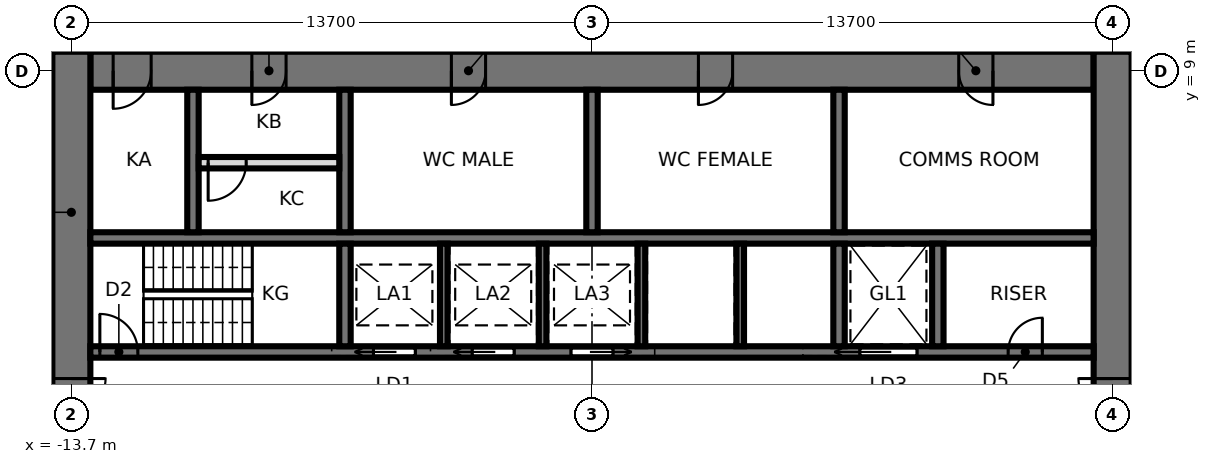
"""IFC4 building model, lengths in metres.
Left out: names, types, materials, properties, quantities, classifications, styles, units other than length and angle.
Written with IfcOpenShell. Run it as: python <this file> out.ifc"""

import sys

from ifc_helpers import new_model, si_unit, direction, frame, frame_2d, origin, place, context, subcontext, project, spatial, rectangle, extrude, element, fill, save


model = new_model("IFC4")
c1 = context("Model", 3, precision=1e-05, world=origin(), true_north=direction((0.0, 1.0)))
c2 = subcontext(c1, "Body", "Model", "MODEL_VIEW")
j1 = project(units=[si_unit("LENGTHUNIT", "METRE"), si_unit("PLANEANGLEUNIT", "RADIAN")], contexts=[c1])
p1 = place(None, origin())
s1 = spatial("IfcSite", under=j1, at=p1, CompositionType="ELEMENT")
p2 = place(p1, origin())
s2 = spatial("IfcBuilding", under=s1, at=p2, CompositionType="ELEMENT")
p3 = place(p2, frame((0.0, 0.0, 44.8)))
s3 = spatial("IfcBuildingStorey", under=s2, at=p3, CompositionType="ELEMENT", Elevation=44.8)
p4 = place(p3, frame((13.2, 9.0, 0.0), z_axis=(0.0, 0.0, 1.0), x_axis=(-1.0, 0.0, 0.0)))
e1 = element("IfcWall", 1, at=p4, inside=s3, PredefinedType="SHEAR", context=c2, shape_type="SweptSolid", body=[
    extrude(rectangle(XDim=26.4, YDim=1.0, at=frame_2d((13.2, 0.0))), origin(), (0.0, 0.0, 1.0), 4.2),
])
p5 = place(p4, frame((2.65, 0.0, 0.0)))
e2 = element("IfcOpeningElement", 2, at=p5, cuts=e1, PredefinedType="OPENING", context=c2, shape_type="SweptSolid", body=[
    extrude(rectangle(XDim=0.9, YDim=2.1, at=frame_2d((0.45, 1.05))), frame((0.0, 0.51, 0.0), z_axis=(0.0, -1.0, 0.0), x_axis=(1.0, 0.0, 0.0)), (0.0, 0.0, 1.0), 1.02),
])
p6 = place(p4, frame((9.5, 0.0, 0.0)))
e3 = element("IfcOpeningElement", 3, at=p6, cuts=e1, PredefinedType="OPENING", context=c2, shape_type="SweptSolid", body=[
    extrude(rectangle(XDim=0.9, YDim=2.1, at=frame_2d((0.45, 1.05))), frame((0.0, 0.51, 0.0), z_axis=(0.0, -1.0, 0.0), x_axis=(1.0, 0.0, 0.0)), (0.0, 0.0, 1.0), 1.02),
])
p7 = place(p4, frame((16.0, 0.0, 0.0)))
e4 = element("IfcOpeningElement", 4, at=p7, cuts=e1, PredefinedType="OPENING", context=c2, shape_type="SweptSolid", body=[
    extrude(rectangle(XDim=0.9, YDim=2.1, at=frame_2d((0.45, 1.05))), frame((0.0, 0.51, 0.0), z_axis=(0.0, -1.0, 0.0), x_axis=(1.0, 0.0, 0.0)), (0.0, 0.0, 1.0), 1.02),
])
p8 = place(p4, frame((21.25, 0.0, 0.0)))
e5 = element("IfcOpeningElement", 5, at=p8, cuts=e1, PredefinedType="OPENING", context=c2, shape_type="SweptSolid", body=[
    extrude(rectangle(XDim=0.9, YDim=2.1, at=frame_2d((0.45, 1.05))), frame((0.0, 0.51, 0.0), z_axis=(0.0, -1.0, 0.0), x_axis=(1.0, 0.0, 0.0)), (0.0, 0.0, 1.0), 1.02),
])
p9 = place(p4, frame((24.8, 0.0, 0.0)))
e6 = element("IfcOpeningElement", 6, at=p9, cuts=e1, PredefinedType="OPENING", context=c2, shape_type="SweptSolid", body=[
    extrude(rectangle(XDim=1.0, YDim=2.1, at=frame_2d((0.5, 1.05))), frame((0.0, 0.51, 0.0), z_axis=(0.0, -1.0, 0.0), x_axis=(1.0, 0.0, 0.0)), (0.0, 0.0, 1.0), 1.02),
])
p10 = place(p3, frame((13.7, -9.5, 0.0), z_axis=(0.0, 0.0, 1.0), x_axis=(0.0, 1.0, 0.0)))
e7 = element("IfcWall", 7, at=p10, inside=s3, PredefinedType="SHEAR", context=c2, shape_type="SweptSolid", body=[
    extrude(rectangle(XDim=19.0, YDim=1.0, at=frame_2d((9.5, 0.0))), origin(), (0.0, 0.0, 1.0), 4.2),
])
p11 = place(p10, frame((8.6, 0.0, 0.0)))
e8 = element("IfcOpeningElement", 8, at=p11, cuts=e7, PredefinedType="OPENING", context=c2, shape_type="SweptSolid", body=[
    extrude(rectangle(XDim=1.8, YDim=2.4, at=frame_2d((0.9, 1.2))), frame((0.0, 0.51, 0.0), z_axis=(0.0, -1.0, 0.0), x_axis=(1.0, 0.0, 0.0)), (0.0, 0.0, 1.0), 1.02),
])
p12 = place(p3, frame((-13.7, 9.5, 0.0), z_axis=(0.0, 0.0, 1.0), x_axis=(0.0, -1.0, 0.0)))
e9 = element("IfcWall", 9, at=p12, inside=s3, PredefinedType="SHEAR", context=c2, shape_type="SweptSolid", body=[
    extrude(rectangle(XDim=19.0, YDim=1.0, at=frame_2d((9.5, 0.0))), origin(), (0.0, 0.0, 1.0), 4.2),
])
p13 = place(p12, frame((8.6, 0.0, 0.0)))
e10 = element("IfcOpeningElement", 10, at=p13, cuts=e9, PredefinedType="OPENING", context=c2, shape_type="SweptSolid", body=[
    extrude(rectangle(XDim=1.8, YDim=2.4, at=frame_2d((0.9, 1.2))), frame((0.0, 0.51, 0.0), z_axis=(0.0, -1.0, 0.0), x_axis=(1.0, 0.0, 0.0)), (0.0, 0.0, 1.0), 1.02),
])
p14 = place(p3, frame((-13.2, 1.6, 0.0), z_axis=(0.0, 0.0, 1.0), x_axis=(1.0, 0.0, 0.0)))
e11 = element("IfcWall", 11, at=p14, inside=s3, PredefinedType="SHEAR", context=c2, shape_type="SweptSolid", body=[
    extrude(rectangle(XDim=26.4, YDim=0.3, at=frame_2d((13.2, 0.0))), origin(), (0.0, 0.0, 1.0), 4.2),
])
p15 = place(p14, frame((0.25, 0.0, 0.0)))
e12 = element("IfcOpeningElement", 12, at=p15, cuts=e11, PredefinedType="OPENING", context=c2, shape_type="SweptSolid", body=[
    extrude(rectangle(XDim=1.0, YDim=2.1, at=frame_2d((0.5, 1.05))), frame((0.0, 0.16, 0.0), z_axis=(0.0, -1.0, 0.0), x_axis=(1.0, 0.0, 0.0)), (0.0, 0.0, 1.0), 0.32),
])
p16 = place(p14, frame((20.25, 0.0, 0.0)))
e13 = element("IfcOpeningElement", 13, at=p16, cuts=e11, PredefinedType="OPENING", context=c2, shape_type="SweptSolid", body=[
    extrude(rectangle(XDim=1.5, YDim=2.4, at=frame_2d((0.75, 1.2))), frame((0.0, 0.16, 0.0), z_axis=(0.0, -1.0, 0.0), x_axis=(1.0, 0.0, 0.0)), (0.0, 0.0, 1.0), 0.32),
])
p17 = place(p14, frame((7.45, 0.0, 0.0)))
e14 = element("IfcOpeningElement", 14, at=p17, cuts=e11, PredefinedType="OPENING", context=c2, shape_type="SweptSolid", body=[
    extrude(rectangle(XDim=1.1, YDim=2.3, at=frame_2d((0.55, 1.15))), frame((0.0, 0.16, 0.0), z_axis=(0.0, -1.0, 0.0), x_axis=(1.0, 0.0, 0.0)), (0.0, 0.0, 1.0), 0.32),
])
p18 = place(p14, frame((10.05, 0.0, 0.0)))
e15 = element("IfcOpeningElement", 15, at=p18, cuts=e11, PredefinedType="OPENING", context=c2, shape_type="SweptSolid", body=[
    extrude(rectangle(XDim=1.1, YDim=2.3, at=frame_2d((0.55, 1.15))), frame((0.0, 0.16, 0.0), z_axis=(0.0, -1.0, 0.0), x_axis=(1.0, 0.0, 0.0)), (0.0, 0.0, 1.0), 0.32),
])
p19 = place(p14, frame((12.65, 0.0, 0.0)))
e16 = element("IfcOpeningElement", 16, at=p19, cuts=e11, PredefinedType="OPENING", context=c2, shape_type="SweptSolid", body=[
    extrude(rectangle(XDim=1.1, YDim=2.3, at=frame_2d((0.55, 1.15))), frame((0.0, 0.16, 0.0), z_axis=(0.0, -1.0, 0.0), x_axis=(1.0, 0.0, 0.0)), (0.0, 0.0, 1.0), 0.32),
])
p20 = place(p14, frame((24.15, 0.0, 0.0)))
e17 = element("IfcOpeningElement", 17, at=p20, cuts=e11, PredefinedType="OPENING", context=c2, shape_type="SweptSolid", body=[
    extrude(rectangle(XDim=0.9, YDim=2.1, at=frame_2d((0.45, 1.05))), frame((0.0, 0.16, 0.0), z_axis=(0.0, -1.0, 0.0), x_axis=(1.0, 0.0, 0.0)), (0.0, 0.0, 1.0), 0.32),
])
p21 = place(p3, frame((-13.2, 4.6, 0.0), z_axis=(0.0, 0.0, 1.0), x_axis=(1.0, 0.0, 0.0)))
e18 = element("IfcWall", 18, at=p21, inside=s3, PredefinedType="SHEAR", context=c2, shape_type="SweptSolid", body=[
    extrude(rectangle(XDim=26.4, YDim=0.3, at=frame_2d((13.2, 0.0))), origin(), (0.0, 0.0, 1.0), 4.2),
])
p22 = place(p3, frame((-6.5, 1.75, 0.0), z_axis=(0.0, 0.0, 1.0), x_axis=(0.0, 1.0, 0.0)))
e19 = element("IfcWall", 19, at=p22, inside=s3, PredefinedType="SHEAR", context=c2, shape_type="SweptSolid", body=[
    extrude(rectangle(XDim=2.7, YDim=0.3, at=frame_2d((1.35, 0.0))), origin(), (0.0, 0.0, 1.0), 4.2),
])
p23 = place(p3, frame((-6.5, 4.75, 0.0), z_axis=(0.0, 0.0, 1.0), x_axis=(0.0, 1.0, 0.0)))
e20 = element("IfcWall", 20, at=p23, inside=s3, PredefinedType="SHEAR", context=c2, shape_type="SweptSolid", body=[
    extrude(rectangle(XDim=3.75, YDim=0.3, at=frame_2d((1.875, 0.0))), origin(), (0.0, 0.0, 1.0), 4.2),
])
p24 = place(p3, frame((6.5, 1.75, 0.0), z_axis=(0.0, 0.0, 1.0), x_axis=(0.0, 1.0, 0.0)))
e21 = element("IfcWall", 21, at=p24, inside=s3, PredefinedType="SHEAR", context=c2, shape_type="SweptSolid", body=[
    extrude(rectangle(XDim=2.7, YDim=0.3, at=frame_2d((1.35, 0.0))), origin(), (0.0, 0.0, 1.0), 4.2),
])
p25 = place(p3, frame((6.5, 4.75, 0.0), z_axis=(0.0, 0.0, 1.0), x_axis=(0.0, 1.0, 0.0)))
e22 = element("IfcWall", 22, at=p25, inside=s3, PredefinedType="SHEAR", context=c2, shape_type="SweptSolid", body=[
    extrude(rectangle(XDim=3.75, YDim=0.3, at=frame_2d((1.875, 0.0))), origin(), (0.0, 0.0, 1.0), 4.2),
])
for number, where, z_axis, x_axis in (
    (23, (-3.9, 1.75, 0.0), (0.0, 0.0, 1.0), (0.0, 1.0, 0.0)),
    (24, (-1.3, 1.75, 0.0), (0.0, 0.0, 1.0), (0.0, 1.0, 0.0)),
    (25, (1.3, 1.75, 0.0), (0.0, 0.0, 1.0), (0.0, 1.0, 0.0)),
    (26, (3.9, 1.75, 0.0), (0.0, 0.0, 1.0), (0.0, 1.0, 0.0)),
):
    element("IfcWall", number, at=place(p3, frame(where, z_axis=z_axis, x_axis=x_axis)), inside=s3, PredefinedType="SHEAR", context=c2, shape_type="SweptSolid", body=[
        extrude(rectangle(XDim=2.7, YDim=0.2, at=frame_2d((1.35, 0.0))), origin(), (0.0, 0.0, 1.0), 4.2),
    ])
for number, where, z_axis, x_axis in (
    (27, (0.0, 4.75, 0.0), (0.0, 0.0, 1.0), (0.0, 1.0, 0.0)),
    (28, (-10.5, 4.75, 0.0), (0.0, 0.0, 1.0), (0.0, 1.0, 0.0)),
):
    element("IfcWall", number, at=place(p3, frame(where, z_axis=z_axis, x_axis=x_axis)), inside=s3, PredefinedType="SHEAR", context=c2, shape_type="SweptSolid", body=[
        extrude(rectangle(XDim=3.75, YDim=0.3, at=frame_2d((1.875, 0.0))), origin(), (0.0, 0.0, 1.0), 4.2),
    ])
p26 = place(p3, frame((9.1, 1.75, 0.0), z_axis=(0.0, 0.0, 1.0), x_axis=(0.0, 1.0, 0.0)))
e29 = element("IfcWall", 29, at=p26, inside=s3, PredefinedType="SHEAR", context=c2, shape_type="SweptSolid", body=[
    extrude(rectangle(XDim=2.7, YDim=0.3, at=frame_2d((1.35, 0.0))), origin(), (0.0, 0.0, 1.0), 4.2),
])
p27 = place(p3, frame((-10.35, 6.58, 0.0), z_axis=(0.0, 0.0, 1.0), x_axis=(1.0, 0.0, 0.0)))
e30 = element("IfcWall", 30, at=p27, inside=s3, PredefinedType="PARTITIONING", context=c2, shape_type="SweptSolid", body=[
    extrude(rectangle(XDim=3.7, YDim=0.3, at=frame_2d((1.85, 0.0))), origin(), (0.0, 0.0, 1.0), 4.04),
])
p28 = place(p27, frame((0.25, 0.0, 0.0)))
e31 = element("IfcOpeningElement", 31, at=p28, cuts=e30, PredefinedType="OPENING", context=c2, shape_type="SweptSolid", body=[
    extrude(rectangle(XDim=1.0, YDim=2.4, at=frame_2d((0.5, 1.2))), frame((0.0, 0.16, 0.0), z_axis=(0.0, -1.0, 0.0), x_axis=(1.0, 0.0, 0.0)), (0.0, 0.0, 1.0), 0.32),
])
p29 = place(p13, origin())
e32 = element("IfcDoor", 32, at=p29, inside=s3, OperationType="DOUBLE_DOOR_SINGLE_SWING", PredefinedType="DOOR", context=c2, shape_type="SweptSolid", body=[
    extrude(rectangle(XDim=1.72, YDim=2.36, at=frame_2d((0.9, 1.18))), frame((0.0, 0.025, 0.0), z_axis=(0.0, -1.0, 0.0), x_axis=(1.0, 0.0, 0.0)), (0.0, 0.0, 1.0), 0.05),
    extrude(rectangle(XDim=0.04, YDim=2.4, at=frame_2d((0.02, 1.2))), frame((0.0, 0.25, 0.0), z_axis=(0.0, -1.0, 0.0), x_axis=(1.0, 0.0, 0.0)), (0.0, 0.0, 1.0), 0.5),
    extrude(rectangle(XDim=0.04, YDim=2.4, at=frame_2d((1.78, 1.2))), frame((0.0, 0.25, 0.0), z_axis=(0.0, -1.0, 0.0), x_axis=(1.0, 0.0, 0.0)), (0.0, 0.0, 1.0), 0.5),
    extrude(rectangle(XDim=1.72, YDim=0.04, at=frame_2d((0.9, 2.38))), frame((0.0, 0.25, 0.0), z_axis=(0.0, -1.0, 0.0), x_axis=(1.0, 0.0, 0.0)), (0.0, 0.0, 1.0), 0.5),
])
fill(e10, e32)
p30 = place(p11, origin())
e33 = element("IfcDoor", 33, at=p30, inside=s3, OperationType="DOUBLE_DOOR_SINGLE_SWING", PredefinedType="DOOR", context=c2, shape_type="SweptSolid", body=[
    extrude(rectangle(XDim=1.72, YDim=2.36, at=frame_2d((0.9, 1.18))), frame((0.0, 0.025, 0.0), z_axis=(0.0, -1.0, 0.0), x_axis=(1.0, 0.0, 0.0)), (0.0, 0.0, 1.0), 0.05),
    extrude(rectangle(XDim=0.04, YDim=2.4, at=frame_2d((0.02, 1.2))), frame((0.0, 0.25, 0.0), z_axis=(0.0, -1.0, 0.0), x_axis=(1.0, 0.0, 0.0)), (0.0, 0.0, 1.0), 0.5),
    extrude(rectangle(XDim=0.04, YDim=2.4, at=frame_2d((1.78, 1.2))), frame((0.0, 0.25, 0.0), z_axis=(0.0, -1.0, 0.0), x_axis=(1.0, 0.0, 0.0)), (0.0, 0.0, 1.0), 0.5),
    extrude(rectangle(XDim=1.72, YDim=0.04, at=frame_2d((0.9, 2.38))), frame((0.0, 0.25, 0.0), z_axis=(0.0, -1.0, 0.0), x_axis=(1.0, 0.0, 0.0)), (0.0, 0.0, 1.0), 0.5),
])
fill(e8, e33)
p31 = place(p15, origin())
e34 = element("IfcDoor", 34, at=p31, inside=s3, OperationType="SINGLE_SWING_LEFT", PredefinedType="DOOR", context=c2, shape_type="SweptSolid", body=[
    extrude(rectangle(XDim=1.0, YDim=2.1, at=frame_2d((0.5, 1.05))), frame((0.0, 0.025, 0.0), z_axis=(0.0, -1.0, 0.0), x_axis=(1.0, 0.0, 0.0)), (0.0, 0.0, 1.0), 0.05),
])
fill(e12, e34)
p32 = place(p16, origin())
e35 = element("IfcDoor", 35, at=p32, inside=s3, OperationType="SLIDING_TO_LEFT", PredefinedType="DOOR", context=c2, shape_type="SweptSolid", body=[
    extrude(rectangle(XDim=1.5, YDim=2.4, at=frame_2d((0.75, 1.2))), frame((0.0, 0.025, 0.0), z_axis=(0.0, -1.0, 0.0), x_axis=(1.0, 0.0, 0.0)), (0.0, 0.0, 1.0), 0.05),
])
fill(e13, e35)
p33 = place(p17, origin())
e36 = element("IfcDoor", 36, at=p33, inside=s3, OperationType="SLIDING_TO_LEFT", PredefinedType="DOOR", context=c2, shape_type="SweptSolid", body=[
    extrude(rectangle(XDim=1.1, YDim=2.3, at=frame_2d((0.55, 1.15))), frame((0.0, 0.025, 0.0), z_axis=(0.0, -1.0, 0.0), x_axis=(1.0, 0.0, 0.0)), (0.0, 0.0, 1.0), 0.05),
])
fill(e14, e36)
p34 = place(p18, origin())
e37 = element("IfcDoor", 37, at=p34, inside=s3, OperationType="SLIDING_TO_LEFT", PredefinedType="DOOR", context=c2, shape_type="SweptSolid", body=[
    extrude(rectangle(XDim=1.1, YDim=2.3, at=frame_2d((0.55, 1.15))), frame((0.0, 0.025, 0.0), z_axis=(0.0, -1.0, 0.0), x_axis=(1.0, 0.0, 0.0)), (0.0, 0.0, 1.0), 0.05),
])
fill(e15, e37)
p35 = place(p19, origin())
e38 = element("IfcDoor", 38, at=p35, inside=s3, OperationType="SLIDING_TO_RIGHT", PredefinedType="DOOR", context=c2, shape_type="SweptSolid", body=[
    extrude(rectangle(XDim=1.1, YDim=2.3, at=frame_2d((0.55, 1.15))), frame((0.0, 0.025, 0.0), z_axis=(0.0, -1.0, 0.0), x_axis=(1.0, 0.0, 0.0)), (0.0, 0.0, 1.0), 0.05),
])
fill(e16, e38)
p36 = place(p20, origin())
e39 = element("IfcDoor", 39, at=p36, inside=s3, OperationType="SINGLE_SWING_RIGHT", PredefinedType="DOOR", context=c2, shape_type="SweptSolid", body=[
    extrude(rectangle(XDim=0.9, YDim=2.1, at=frame_2d((0.45, 1.05))), frame((0.0, 0.025, 0.0), z_axis=(0.0, -1.0, 0.0), x_axis=(1.0, 0.0, 0.0)), (0.0, 0.0, 1.0), 0.05),
])
fill(e17, e39)
p37 = place(p5, origin())
e40 = element("IfcDoor", 40, at=p37, inside=s3, OperationType="SINGLE_SWING_LEFT", PredefinedType="DOOR", context=c2, shape_type="SweptSolid", body=[
    extrude(rectangle(XDim=0.82, YDim=2.06, at=frame_2d((0.45, 1.03))), frame((0.0, 0.025, 0.0), z_axis=(0.0, -1.0, 0.0), x_axis=(1.0, 0.0, 0.0)), (0.0, 0.0, 1.0), 0.05),
    extrude(rectangle(XDim=0.04, YDim=2.1, at=frame_2d((0.02, 1.05))), frame((0.0, 0.25, 0.0), z_axis=(0.0, -1.0, 0.0), x_axis=(1.0, 0.0, 0.0)), (0.0, 0.0, 1.0), 0.5),
    extrude(rectangle(XDim=0.04, YDim=2.1, at=frame_2d((0.88, 1.05))), frame((0.0, 0.25, 0.0), z_axis=(0.0, -1.0, 0.0), x_axis=(1.0, 0.0, 0.0)), (0.0, 0.0, 1.0), 0.5),
    extrude(rectangle(XDim=0.82, YDim=0.04, at=frame_2d((0.45, 2.08))), frame((0.0, 0.25, 0.0), z_axis=(0.0, -1.0, 0.0), x_axis=(1.0, 0.0, 0.0)), (0.0, 0.0, 1.0), 0.5),
])
fill(e2, e40)
p38 = place(p6, origin())
e41 = element("IfcDoor", 41, at=p38, inside=s3, OperationType="SINGLE_SWING_RIGHT", PredefinedType="DOOR", context=c2, shape_type="SweptSolid", body=[
    extrude(rectangle(XDim=0.82, YDim=2.06, at=frame_2d((0.45, 1.03))), frame((0.0, 0.025, 0.0), z_axis=(0.0, -1.0, 0.0), x_axis=(1.0, 0.0, 0.0)), (0.0, 0.0, 1.0), 0.05),
    extrude(rectangle(XDim=0.04, YDim=2.1, at=frame_2d((0.02, 1.05))), frame((0.0, 0.25, 0.0), z_axis=(0.0, -1.0, 0.0), x_axis=(1.0, 0.0, 0.0)), (0.0, 0.0, 1.0), 0.5),
    extrude(rectangle(XDim=0.04, YDim=2.1, at=frame_2d((0.88, 1.05))), frame((0.0, 0.25, 0.0), z_axis=(0.0, -1.0, 0.0), x_axis=(1.0, 0.0, 0.0)), (0.0, 0.0, 1.0), 0.5),
    extrude(rectangle(XDim=0.82, YDim=0.04, at=frame_2d((0.45, 2.08))), frame((0.0, 0.25, 0.0), z_axis=(0.0, -1.0, 0.0), x_axis=(1.0, 0.0, 0.0)), (0.0, 0.0, 1.0), 0.5),
])
fill(e3, e41)
p39 = place(p7, origin())
e42 = element("IfcDoor", 42, at=p39, inside=s3, OperationType="SINGLE_SWING_RIGHT", PredefinedType="DOOR", context=c2, shape_type="SweptSolid", body=[
    extrude(rectangle(XDim=0.82, YDim=2.06, at=frame_2d((0.45, 1.03))), frame((0.0, 0.025, 0.0), z_axis=(0.0, -1.0, 0.0), x_axis=(1.0, 0.0, 0.0)), (0.0, 0.0, 1.0), 0.05),
    extrude(rectangle(XDim=0.04, YDim=2.1, at=frame_2d((0.02, 1.05))), frame((0.0, 0.25, 0.0), z_axis=(0.0, -1.0, 0.0), x_axis=(1.0, 0.0, 0.0)), (0.0, 0.0, 1.0), 0.5),
    extrude(rectangle(XDim=0.04, YDim=2.1, at=frame_2d((0.88, 1.05))), frame((0.0, 0.25, 0.0), z_axis=(0.0, -1.0, 0.0), x_axis=(1.0, 0.0, 0.0)), (0.0, 0.0, 1.0), 0.5),
    extrude(rectangle(XDim=0.82, YDim=0.04, at=frame_2d((0.45, 2.08))), frame((0.0, 0.25, 0.0), z_axis=(0.0, -1.0, 0.0), x_axis=(1.0, 0.0, 0.0)), (0.0, 0.0, 1.0), 0.5),
])
fill(e4, e42)
p40 = place(p8, origin())
e43 = element("IfcDoor", 43, at=p40, inside=s3, OperationType="SINGLE_SWING_RIGHT", PredefinedType="DOOR", context=c2, shape_type="SweptSolid", body=[
    extrude(rectangle(XDim=0.82, YDim=2.06, at=frame_2d((0.45, 1.03))), frame((0.0, 0.025, 0.0), z_axis=(0.0, -1.0, 0.0), x_axis=(1.0, 0.0, 0.0)), (0.0, 0.0, 1.0), 0.05),
    extrude(rectangle(XDim=0.04, YDim=2.1, at=frame_2d((0.02, 1.05))), frame((0.0, 0.25, 0.0), z_axis=(0.0, -1.0, 0.0), x_axis=(1.0, 0.0, 0.0)), (0.0, 0.0, 1.0), 0.5),
    extrude(rectangle(XDim=0.04, YDim=2.1, at=frame_2d((0.88, 1.05))), frame((0.0, 0.25, 0.0), z_axis=(0.0, -1.0, 0.0), x_axis=(1.0, 0.0, 0.0)), (0.0, 0.0, 1.0), 0.5),
    extrude(rectangle(XDim=0.82, YDim=0.04, at=frame_2d((0.45, 2.08))), frame((0.0, 0.25, 0.0), z_axis=(0.0, -1.0, 0.0), x_axis=(1.0, 0.0, 0.0)), (0.0, 0.0, 1.0), 0.5),
])
fill(e5, e43)
p41 = place(p9, origin())
e44 = element("IfcDoor", 44, at=p41, inside=s3, OperationType="SINGLE_SWING_RIGHT", PredefinedType="DOOR", context=c2, shape_type="SweptSolid", body=[
    extrude(rectangle(XDim=0.92, YDim=2.06, at=frame_2d((0.5, 1.03))), frame((0.0, 0.025, 0.0), z_axis=(0.0, -1.0, 0.0), x_axis=(1.0, 0.0, 0.0)), (0.0, 0.0, 1.0), 0.05),
    extrude(rectangle(XDim=0.04, YDim=2.1, at=frame_2d((0.02, 1.05))), frame((0.0, 0.25, 0.0), z_axis=(0.0, -1.0, 0.0), x_axis=(1.0, 0.0, 0.0)), (0.0, 0.0, 1.0), 0.5),
    extrude(rectangle(XDim=0.04, YDim=2.1, at=frame_2d((0.98, 1.05))), frame((0.0, 0.25, 0.0), z_axis=(0.0, -1.0, 0.0), x_axis=(1.0, 0.0, 0.0)), (0.0, 0.0, 1.0), 0.5),
    extrude(rectangle(XDim=0.92, YDim=0.04, at=frame_2d((0.5, 2.08))), frame((0.0, 0.25, 0.0), z_axis=(0.0, -1.0, 0.0), x_axis=(1.0, 0.0, 0.0)), (0.0, 0.0, 1.0), 0.5),
])
fill(e6, e44)
p42 = place(p28, frame((1.0, 0.0, 0.0), z_axis=(0.0, 0.0, 1.0), x_axis=(-1.0, 0.0, 0.0)))
e45 = element("IfcDoor", 45, at=p42, inside=s3, OperationType="SINGLE_SWING_RIGHT", PredefinedType="DOOR", context=c2, shape_type="SweptSolid", body=[
    extrude(rectangle(XDim=1.0, YDim=2.4, at=frame_2d((0.5, 1.2))), frame((0.0, 0.025, 0.0), z_axis=(0.0, -1.0, 0.0), x_axis=(1.0, 0.0, 0.0)), (0.0, 0.0, 1.0), 0.05),
])
fill(e31, e45)
save(model, sys.argv[1])
